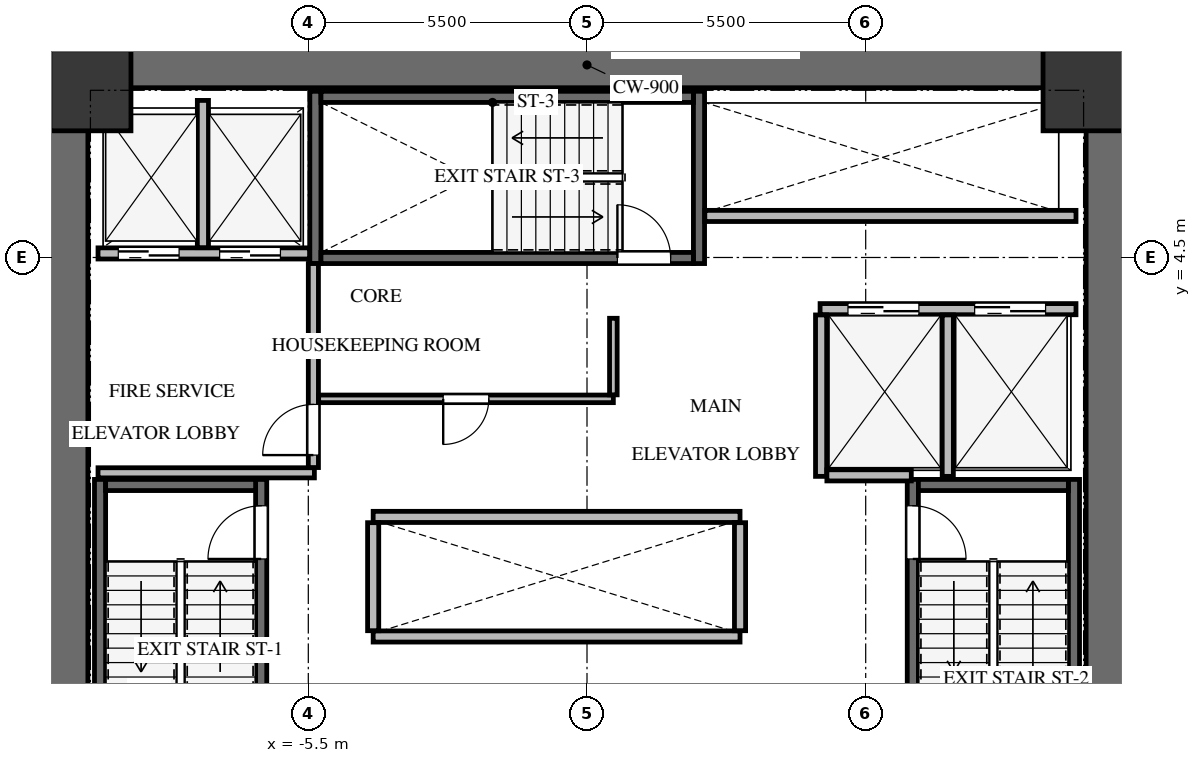
"""IFC4 building model, lengths in metres.
Left out: names, types, materials, properties, quantities, classifications, styles, units other than length and angle.
Written with IfcOpenShell. Run it as: python <this file> out.ifc"""

import sys

from ifc_helpers import new_model, si_unit, direction, frame, frame_2d, origin, origin_2d, place, context, subcontext, project, spatial, rectangle, extrude, source, transform, mapped, element, fill, save


model = new_model("IFC4")
c1 = context("Model", 3, precision=1e-05, world=origin(), true_north=direction((0.0, 1.0)))
c2 = subcontext(c1, "Body", "Model", "MODEL_VIEW")
j1 = project(units=[si_unit("LENGTHUNIT", "METRE"), si_unit("PLANEANGLEUNIT", "RADIAN")], contexts=[c1])
p1 = place(None, origin())
s1 = spatial("IfcSite", under=j1, at=p1, CompositionType="ELEMENT")
p2 = place(p1, origin())
s2 = spatial("IfcBuilding", under=s1, at=p2, CompositionType="ELEMENT")
p3 = place(p2, frame((0.0, 0.0, 58.8)))
s3 = spatial("IfcBuildingStorey", under=s2, at=p3, CompositionType="ELEMENT", Elevation=58.8)
for number, where, z_axis, x_axis in (
    (1, (-10.3, -8.75, 0.0), (0.0, 0.0, 1.0), (0.0, 1.0, 0.0)),
    (2, (10.3, -8.75, 0.0), (0.0, 0.0, 1.0), (0.0, 1.0, 0.0)),
):
    element("IfcWall", number, at=place(p3, frame(where, z_axis=z_axis, x_axis=x_axis)), inside=s3, PredefinedType="SHEAR", context=c2, shape_type="SweptSolid", body=[
        extrude(rectangle(XDim=17.5, YDim=0.9, at=frame_2d((8.75, 0.0))), origin(), (0.0, 0.0, 1.0), 3.3),
    ])
p4 = place(p3, frame((-9.85, 8.3, 0.0), z_axis=(0.0, 0.0, 1.0), x_axis=(1.0, 0.0, 0.0)))
e3 = element("IfcWall", 3, at=p4, inside=s3, PredefinedType="SHEAR", context=c2, shape_type="SweptSolid", body=[
    extrude(rectangle(XDim=19.7, YDim=0.9, at=frame_2d((9.85, 0.0))), origin(), (0.0, 0.0, 1.0), 3.3),
])
p5 = place(p3, frame((-6.43, -7.77, -0.24), z_axis=(0.0, 0.0, 1.0), x_axis=(0.0, 1.0, 0.0)))
e4 = element("IfcWall", 4, at=p5, inside=s3, PredefinedType="SHEAR", context=c2, shape_type="SweptSolid", body=[
    extrude(rectangle(XDim=7.89, YDim=0.22, at=frame_2d((3.945, 0.0))), origin(), (0.0, 0.0, 1.0), 3.3),
])
p6 = place(p5, frame((6.32, 0.0, 0.0)))
e5 = element("IfcOpeningElement", 5, at=p6, cuts=e4, PredefinedType="OPENING", context=c2, shape_type="SweptSolid", body=[
    extrude(rectangle(XDim=1.05, YDim=2.15, at=frame_2d((0.525, 1.075))), frame((0.0, 0.12, 0.0), z_axis=(0.0, -1.0, 0.0), x_axis=(1.0, 0.0, 0.0)), (0.0, 0.0, 1.0), 0.24),
])
p7 = place(p3, frame((-9.61, 0.12, -0.24), z_axis=(0.0, 0.0, 1.0), x_axis=(0.0, -1.0, 0.0)))
e6 = element("IfcWall", 6, at=p7, inside=s3, PredefinedType="SHEAR", context=c2, shape_type="SweptSolid", body=[
    extrude(rectangle(XDim=7.89, YDim=0.22, at=frame_2d((3.945, 0.0))), origin(), (0.0, 0.0, 1.0), 3.3),
])
p8 = place(p3, frame((-6.54, 0.01, -0.24), z_axis=(0.0, 0.0, 1.0), x_axis=(-1.0, 0.0, 0.0)))
e7 = element("IfcWall", 7, at=p8, inside=s3, PredefinedType="SHEAR", context=c2, shape_type="SweptSolid", body=[
    extrude(rectangle(XDim=2.96, YDim=0.22, at=frame_2d((1.48, 0.0))), origin(), (0.0, 0.0, 1.0), 3.3),
])
p9 = place(p3, frame((9.61, -7.77, -0.24), z_axis=(0.0, 0.0, 1.0), x_axis=(0.0, 1.0, 0.0)))
e8 = element("IfcWall", 8, at=p9, inside=s3, PredefinedType="SHEAR", context=c2, shape_type="SweptSolid", body=[
    extrude(rectangle(XDim=7.89, YDim=0.22, at=frame_2d((3.945, 0.0))), origin(), (0.0, 0.0, 1.0), 3.3),
])
p10 = place(p3, frame((6.43, 0.12, -0.24), z_axis=(0.0, 0.0, 1.0), x_axis=(0.0, -1.0, 0.0)))
e9 = element("IfcWall", 9, at=p10, inside=s3, PredefinedType="SHEAR", context=c2, shape_type="SweptSolid", body=[
    extrude(rectangle(XDim=7.89, YDim=0.22, at=frame_2d((3.945, 0.0))), origin(), (0.0, 0.0, 1.0), 3.3),
])
p11 = place(p10, frame((0.52, 0.0, 0.0)))
e10 = element("IfcOpeningElement", 10, at=p11, cuts=e9, PredefinedType="OPENING", context=c2, shape_type="SweptSolid", body=[
    extrude(rectangle(XDim=1.05, YDim=2.15, at=frame_2d((0.525, 1.075))), frame((0.0, 0.12, 0.0), z_axis=(0.0, -1.0, 0.0), x_axis=(1.0, 0.0, 0.0)), (0.0, 0.0, 1.0), 0.24),
])
p12 = place(p3, frame((9.5, 0.01, -0.24), z_axis=(0.0, 0.0, 1.0), x_axis=(-1.0, 0.0, 0.0)))
e11 = element("IfcWall", 11, at=p12, inside=s3, PredefinedType="SHEAR", context=c2, shape_type="SweptSolid", body=[
    extrude(rectangle(XDim=2.96, YDim=0.22, at=frame_2d((1.48, 0.0))), origin(), (0.0, 0.0, 1.0), 3.3),
])
for number, where, z_axis, x_axis in (
    (12, (2.21, 4.38, -0.24), (0.0, 0.0, 1.0), (0.0, 1.0, 0.0)),
    (13, (-5.36, 7.78, -0.24), (0.0, 0.0, 1.0), (0.0, -1.0, 0.0)),
):
    element("IfcWall", number, at=place(p3, frame(where, z_axis=z_axis, x_axis=x_axis)), inside=s3, PredefinedType="SHEAR", context=c2, shape_type="SweptSolid", body=[
        extrude(rectangle(XDim=3.4, YDim=0.22, at=frame_2d((1.7, 0.0))), origin(), (0.0, 0.0, 1.0), 3.3),
    ])
p13 = place(p3, frame((-5.25, 4.49, -0.24), z_axis=(0.0, 0.0, 1.0), x_axis=(1.0, 0.0, 0.0)))
e14 = element("IfcWall", 14, at=p13, inside=s3, PredefinedType="SHEAR", context=c2, shape_type="SweptSolid", body=[
    extrude(rectangle(XDim=7.35, YDim=0.22, at=frame_2d((3.675, 0.0))), origin(), (0.0, 0.0, 1.0), 3.3),
])
p14 = place(p13, frame((5.85, 0.0, 0.0)))
e15 = element("IfcOpeningElement", 15, at=p14, cuts=e14, PredefinedType="OPENING", context=c2, shape_type="SweptSolid", body=[
    extrude(rectangle(XDim=1.05, YDim=2.15, at=frame_2d((0.525, 1.075))), frame((0.0, 0.12, 0.0), z_axis=(0.0, -1.0, 0.0), x_axis=(1.0, 0.0, 0.0)), (0.0, 0.0, 1.0), 0.24),
])
p15 = place(p3, frame((2.1, 7.67, -0.24), z_axis=(0.0, 0.0, 1.0), x_axis=(-1.0, 0.0, 0.0)))
e16 = element("IfcWall", 16, at=p15, inside=s3, PredefinedType="SHEAR", context=c2, shape_type="SweptSolid", body=[
    extrude(rectangle(XDim=7.35, YDim=0.22, at=frame_2d((3.675, 0.0))), origin(), (0.0, 0.0, 1.0), 3.3),
])
m1 = source(origin(), c2, "Body", "SweptSolid", [
    extrude(rectangle(XDim=1.6, YDim=1.6, at=origin_2d()), origin(), (0.0, 0.0, 1.0), 3.3),
])
for number, where, z_axis, x_axis in (
    (17, (9.8, 7.8, -0.24), (0.0, 0.0, 1.0), (1.0, 0.0, 0.0)),
    (18, (-9.8, 7.8, -0.24), (0.0, 0.0, 1.0), (1.0, 0.0, 0.0)),
):
    element("IfcColumn", number, at=place(p3, frame(where, z_axis=z_axis, x_axis=x_axis)), inside=s3, PredefinedType="COLUMN", context=c2, shape_type="MappedRepresentation", body=[
        mapped(m1, transform((0.0, 0.0, 0.0), x_axis=(1.0, 0.0, 0.0), y_axis=(0.0, 1.0, 0.0), z_axis=(0.0, 0.0, 1.0), scale=1.0)),
    ])
p16 = place(p3, frame((-9.65, 4.58, 0.0), z_axis=(0.0, 0.0, 1.0), x_axis=(1.0, 0.0, 0.0)))
e19 = element("IfcWall", 19, at=p16, inside=s3, PredefinedType="SOLIDWALL", context=c2, shape_type="SweptSolid", body=[
    extrude(rectangle(XDim=4.175, YDim=0.22, at=frame_2d((2.087, 0.0))), origin(), (0.0, 0.0, 1.0), 3.045),
])
p17 = place(p16, frame((0.4, 0.0, 0.0)))
e20 = element("IfcOpeningElement", 20, at=p17, cuts=e19, PredefinedType="OPENING", context=c2, shape_type="SweptSolid", body=[
    extrude(rectangle(XDim=1.2, YDim=2.15, at=frame_2d((0.6, 1.075))), frame((0.0, 0.12, 0.0), z_axis=(0.0, -1.0, 0.0), x_axis=(1.0, 0.0, 0.0)), (0.0, 0.0, 1.0), 0.24),
])
p18 = place(p16, frame((2.4, 0.0, 0.0)))
e21 = element("IfcOpeningElement", 21, at=p18, cuts=e19, PredefinedType="OPENING", context=c2, shape_type="SweptSolid", body=[
    extrude(rectangle(XDim=1.2, YDim=2.15, at=frame_2d((0.6, 1.075))), frame((0.0, 0.12, 0.0), z_axis=(0.0, -1.0, 0.0), x_axis=(1.0, 0.0, 0.0)), (0.0, 0.0, 1.0), 0.24),
])
p19 = place(p3, frame((-7.58, 4.694, 0.0), z_axis=(0.0, 0.0, 1.0), x_axis=(0.0, 1.0, 0.0)))
e22 = element("IfcWall", 22, at=p19, inside=s3, PredefinedType="SOLIDWALL", context=c2, shape_type="SweptSolid", body=[
    extrude(rectangle(XDim=2.906, YDim=0.22, at=frame_2d((1.453, 0.0))), origin(), (0.0, 0.0, 1.0), 3.045),
])
p20 = place(p3, frame((-9.65, 0.25, 0.0), z_axis=(0.0, 0.0, 1.0), x_axis=(1.0, 0.0, 0.0)))
e23 = element("IfcWall", 23, at=p20, inside=s3, PredefinedType="SOLIDWALL", context=c2, shape_type="SweptSolid", body=[
    extrude(rectangle(XDim=4.27, YDim=0.2, at=frame_2d((2.135, 0.0))), origin(), (0.0, 0.0, 1.0), 3.045),
])
p21 = place(p3, frame((-5.4, 0.354, 0.0), z_axis=(0.0, 0.0, 1.0), x_axis=(0.0, 1.0, 0.0)))
e24 = element("IfcWall", 24, at=p21, inside=s3, PredefinedType="SOLIDWALL", context=c2, shape_type="SweptSolid", body=[
    extrude(rectangle(XDim=4.026, YDim=0.2, at=frame_2d((2.013, 0.0))), origin(), (0.0, 0.0, 1.0), 3.045),
])
p22 = place(p21, frame((0.246, 0.0, 0.0)))
e25 = element("IfcOpeningElement", 25, at=p22, cuts=e24, PredefinedType="OPENING", context=c2, shape_type="SweptSolid", body=[
    extrude(rectangle(XDim=1.0, YDim=2.15, at=frame_2d((0.5, 1.075))), frame((0.0, 0.11, 0.0), z_axis=(0.0, -1.0, 0.0), x_axis=(1.0, 0.0, 0.0)), (0.0, 0.0, 1.0), 0.22),
])
p23 = place(p3, frame((4.6, 3.48, 0.0), z_axis=(0.0, 0.0, 1.0), x_axis=(1.0, 0.0, 0.0)))
e26 = element("IfcWall", 26, at=p23, inside=s3, PredefinedType="SOLIDWALL", context=c2, shape_type="SweptSolid", body=[
    extrude(rectangle(XDim=5.05, YDim=0.22, at=frame_2d((2.525, 0.0))), origin(), (0.0, 0.0, 1.0), 3.045),
])
p24 = place(p23, frame((0.55, 0.0, 0.0)))
e27 = element("IfcOpeningElement", 27, at=p24, cuts=e26, PredefinedType="OPENING", context=c2, shape_type="SweptSolid", body=[
    extrude(rectangle(XDim=1.4, YDim=2.15, at=frame_2d((0.7, 1.075))), frame((0.0, 0.12, 0.0), z_axis=(0.0, -1.0, 0.0), x_axis=(1.0, 0.0, 0.0)), (0.0, 0.0, 1.0), 0.24),
])
p25 = place(p23, frame((3.05, 0.0, 0.0)))
e28 = element("IfcOpeningElement", 28, at=p25, cuts=e26, PredefinedType="OPENING", context=c2, shape_type="SweptSolid", body=[
    extrude(rectangle(XDim=1.4, YDim=2.15, at=frame_2d((0.7, 1.075))), frame((0.0, 0.12, 0.0), z_axis=(0.0, -1.0, 0.0), x_axis=(1.0, 0.0, 0.0)), (0.0, 0.0, 1.0), 0.24),
])
for number, where, z_axis, x_axis in (
    (29, (4.62, 0.18, 0.0), (0.0, 0.0, 1.0), (0.0, 1.0, 0.0)),
    (30, (7.12, 0.18, 0.0), (0.0, 0.0, 1.0), (0.0, 1.0, 0.0)),
):
    element("IfcWall", number, at=place(p3, frame(where, z_axis=z_axis, x_axis=x_axis)), inside=s3, PredefinedType="SOLIDWALL", context=c2, shape_type="SweptSolid", body=[
        extrude(rectangle(XDim=3.186, YDim=0.22, at=frame_2d((1.593, 0.0))), origin(), (0.0, 0.0, 1.0), 3.045),
    ])
p26 = place(p3, frame((4.734, 0.2, 0.0), z_axis=(0.0, 0.0, 1.0), x_axis=(1.0, 0.0, 0.0)))
e31 = element("IfcWall", 31, at=p26, inside=s3, PredefinedType="SOLIDWALL", context=c2, shape_type="SweptSolid", body=[
    extrude(rectangle(XDim=1.666, YDim=0.22, at=frame_2d((0.833, 0.0))), origin(), (0.0, 0.0, 1.0), 3.045),
])
for number, where, z_axis, x_axis in (
    (32, (-4.22, -2.98, 0.0), (0.0, 0.0, 1.0), (1.0, 0.0, 0.0)),
    (33, (-4.22, -0.62, 0.0), (0.0, 0.0, 1.0), (1.0, 0.0, 0.0)),
):
    element("IfcWall", number, at=place(p3, frame(where, z_axis=z_axis, x_axis=x_axis)), inside=s3, PredefinedType="SOLIDWALL", context=c2, shape_type="SweptSolid", body=[
        extrude(rectangle(XDim=7.24, YDim=0.22, at=frame_2d((3.62, 0.0))), origin(), (0.0, 0.0, 1.0), 3.045),
    ])
for number, where, z_axis, x_axis in (
    (34, (-4.22, -2.866, 0.0), (0.0, 0.0, 1.0), (0.0, 1.0, 0.0)),
    (35, (3.02, -2.866, 0.0), (0.0, 0.0, 1.0), (0.0, 1.0, 0.0)),
):
    element("IfcWall", number, at=place(p3, frame(where, z_axis=z_axis, x_axis=x_axis)), inside=s3, PredefinedType="SOLIDWALL", context=c2, shape_type="SweptSolid", body=[
        extrude(rectangle(XDim=2.132, YDim=0.22, at=frame_2d((1.066, 0.0))), origin(), (0.0, 0.0, 1.0), 3.045),
    ])
p27 = place(p3, frame((2.325, 5.32, 0.0), z_axis=(0.0, 0.0, 1.0), x_axis=(1.0, 0.0, 0.0)))
e36 = element("IfcWall", 36, at=p27, inside=s3, PredefinedType="SOLIDWALL", context=c2, shape_type="SweptSolid", body=[
    extrude(rectangle(XDim=7.325, YDim=0.22, at=frame_2d((3.663, 0.0))), origin(), (0.0, 0.0, 1.0), 3.045),
])
p28 = place(p3, frame((0.52, 1.71, 0.0), z_axis=(0.0, 0.0, 1.0), x_axis=(-1.0, 0.0, 0.0)))
e37 = element("IfcWall", 37, at=p28, inside=s3, PredefinedType="PARTITIONING", context=c2, shape_type="SweptSolid", body=[
    extrude(rectangle(XDim=5.816, YDim=0.15, at=frame_2d((2.908, 0.0))), origin(), (0.0, 0.0, 1.0), 3.045),
])
p29 = place(p28, frame((2.458, 0.0, 0.0)))
e38 = element("IfcOpeningElement", 38, at=p29, cuts=e37, PredefinedType="OPENING", context=c2, shape_type="SweptSolid", body=[
    extrude(rectangle(XDim=0.9, YDim=2.05, at=frame_2d((0.45, 1.025))), frame((0.0, 0.085, 0.0), z_axis=(0.0, -1.0, 0.0), x_axis=(1.0, 0.0, 0.0)), (0.0, 0.0, 1.0), 0.17),
])
p30 = place(p3, frame((0.52, 3.3, 0.0), z_axis=(0.0, 0.0, 1.0), x_axis=(0.0, -1.0, 0.0)))
e39 = element("IfcWall", 39, at=p30, inside=s3, PredefinedType="PARTITIONING", context=c2, shape_type="SweptSolid", body=[
    extrude(rectangle(XDim=1.511, YDim=0.15, at=frame_2d((0.755, 0.0))), origin(), (0.0, 0.0, 1.0), 3.045),
])
m2 = source(origin(), c2, "Body", "SweptSolid", [
    extrude(rectangle(XDim=1.05, YDim=2.15, at=frame_2d((0.525, 1.075))), frame((0.0, 0.025, 0.0), z_axis=(0.0, -1.0, 0.0), x_axis=(1.0, 0.0, 0.0)), (0.0, 0.0, 1.0), 0.05),
])
p31 = place(p6, origin())
e40 = element("IfcDoor", 40, at=p31, inside=s3, OperationType="SINGLE_SWING_LEFT", PredefinedType="DOOR", context=c2, shape_type="MappedRepresentation", body=[
    mapped(m2, transform((0.0, 0.0, 0.0), x_axis=(1.0, 0.0, 0.0), y_axis=(0.0, 1.0, 0.0), z_axis=(0.0, 0.0, 1.0), scale=1.0)),
])
fill(e5, e40)
m3 = source(origin(), c2, "Body", "SweptSolid", [
    extrude(rectangle(XDim=1.05, YDim=2.15, at=frame_2d((0.525, 1.075))), frame((0.0, 0.025, 0.0), z_axis=(0.0, -1.0, 0.0), x_axis=(1.0, 0.0, 0.0)), (0.0, 0.0, 1.0), 0.05),
])
p32 = place(p11, origin())
e41 = element("IfcDoor", 41, at=p32, inside=s3, OperationType="SINGLE_SWING_RIGHT", PredefinedType="DOOR", context=c2, shape_type="MappedRepresentation", body=[
    mapped(m3, transform((0.0, 0.0, 0.0), x_axis=(1.0, 0.0, 0.0), y_axis=(0.0, 1.0, 0.0), z_axis=(0.0, 0.0, 1.0), scale=1.0)),
])
fill(e10, e41)
p33 = place(p14, origin())
e42 = element("IfcDoor", 42, at=p33, inside=s3, OperationType="SINGLE_SWING_LEFT", PredefinedType="DOOR", context=c2, shape_type="MappedRepresentation", body=[
    mapped(m2, transform((0.0, 0.0, 0.0), x_axis=(1.0, 0.0, 0.0), y_axis=(0.0, 1.0, 0.0), z_axis=(0.0, 0.0, 1.0), scale=1.0)),
])
fill(e15, e42)
m4 = source(origin(), c2, "Body", "SweptSolid", [
    extrude(rectangle(XDim=1.2, YDim=2.15, at=frame_2d((0.6, 1.075))), frame((0.0, 0.025, 0.0), z_axis=(0.0, -1.0, 0.0), x_axis=(1.0, 0.0, 0.0)), (0.0, 0.0, 1.0), 0.05),
])
p34 = place(p17, origin())
e43 = element("IfcDoor", 43, at=p34, inside=s3, OperationType="DOUBLE_DOOR_SLIDING", PredefinedType="DOOR", context=c2, shape_type="MappedRepresentation", body=[
    mapped(m4, transform((0.0, 0.0, 0.0), x_axis=(1.0, 0.0, 0.0), y_axis=(0.0, 1.0, 0.0), z_axis=(0.0, 0.0, 1.0), scale=1.0)),
])
fill(e20, e43)
p35 = place(p18, origin())
e44 = element("IfcDoor", 44, at=p35, inside=s3, OperationType="DOUBLE_DOOR_SLIDING", PredefinedType="DOOR", context=c2, shape_type="MappedRepresentation", body=[
    mapped(m4, transform((0.0, 0.0, 0.0), x_axis=(1.0, 0.0, 0.0), y_axis=(0.0, 1.0, 0.0), z_axis=(0.0, 0.0, 1.0), scale=1.0)),
])
fill(e21, e44)
m5 = source(origin(), c2, "Body", "SweptSolid", [
    extrude(rectangle(XDim=1.0, YDim=2.15, at=frame_2d((0.5, 1.075))), frame((0.0, 0.025, 0.0), z_axis=(0.0, -1.0, 0.0), x_axis=(1.0, 0.0, 0.0)), (0.0, 0.0, 1.0), 0.05),
])
p36 = place(p22, origin())
e45 = element("IfcDoor", 45, at=p36, inside=s3, OperationType="SINGLE_SWING_LEFT", PredefinedType="DOOR", context=c2, shape_type="MappedRepresentation", body=[
    mapped(m5, transform((0.0, 0.0, 0.0), x_axis=(1.0, 0.0, 0.0), y_axis=(0.0, 1.0, 0.0), z_axis=(0.0, 0.0, 1.0), scale=1.0)),
])
fill(e25, e45)
m6 = source(origin(), c2, "Body", "SweptSolid", [
    extrude(rectangle(XDim=1.4, YDim=2.15, at=frame_2d((0.7, 1.075))), frame((0.0, 0.025, 0.0), z_axis=(0.0, -1.0, 0.0), x_axis=(1.0, 0.0, 0.0)), (0.0, 0.0, 1.0), 0.05),
])
p37 = place(p24, origin())
e46 = element("IfcDoor", 46, at=p37, inside=s3, OperationType="DOUBLE_DOOR_SLIDING", PredefinedType="DOOR", context=c2, shape_type="MappedRepresentation", body=[
    mapped(m6, transform((0.0, 0.0, 0.0), x_axis=(1.0, 0.0, 0.0), y_axis=(0.0, 1.0, 0.0), z_axis=(0.0, 0.0, 1.0), scale=1.0)),
])
fill(e27, e46)
p38 = place(p25, origin())
e47 = element("IfcDoor", 47, at=p38, inside=s3, OperationType="DOUBLE_DOOR_SLIDING", PredefinedType="DOOR", context=c2, shape_type="MappedRepresentation", body=[
    mapped(m6, transform((0.0, 0.0, 0.0), x_axis=(1.0, 0.0, 0.0), y_axis=(0.0, 1.0, 0.0), z_axis=(0.0, 0.0, 1.0), scale=1.0)),
])
fill(e28, e47)
m7 = source(origin(), c2, "Body", "SweptSolid", [
    extrude(rectangle(XDim=0.9, YDim=2.05, at=frame_2d((0.45, 1.025))), frame((0.0, 0.025, 0.0), z_axis=(0.0, -1.0, 0.0), x_axis=(1.0, 0.0, 0.0)), (0.0, 0.0, 1.0), 0.05),
])
p39 = place(p29, origin())
e48 = element("IfcDoor", 48, at=p39, inside=s3, OperationType="SINGLE_SWING_RIGHT", PredefinedType="DOOR", context=c2, shape_type="MappedRepresentation", body=[
    mapped(m7, transform((0.0, 0.0, 0.0), x_axis=(1.0, 0.0, 0.0), y_axis=(0.0, 1.0, 0.0), z_axis=(0.0, 0.0, 1.0), scale=1.0)),
])
fill(e38, e48)
save(model, sys.argv[1])
